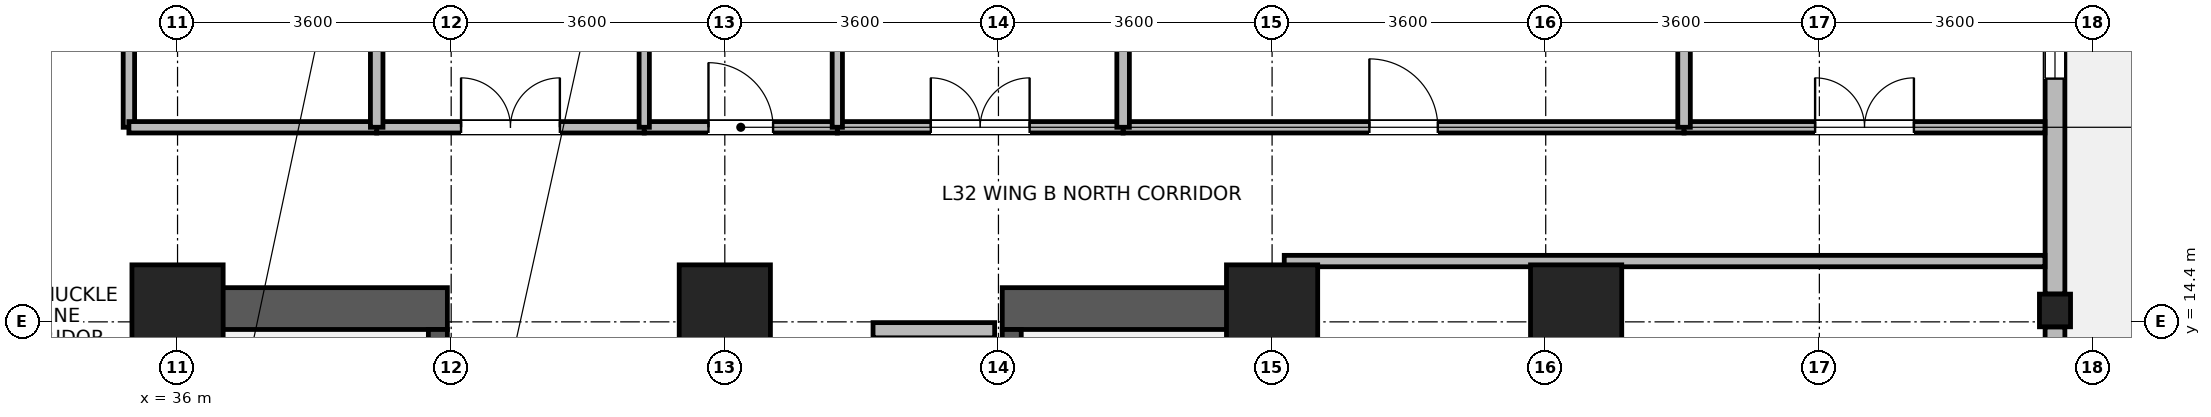
"""IFC4 building model, lengths in metres.
Left out: names, types, materials, properties, quantities, classifications, styles, units other than length and angle.
Written with IfcOpenShell. Run it as: python <this file> out.ifc"""

import sys

from ifc_helpers import new_model, si_unit, direction, frame, frame_2d, origin, origin_2d, place, context, subcontext, project, spatial, rectangle, i_section, extrude, source, transform, mapped, element, fill, save


model = new_model("IFC4")
c1 = context("Model", 3, precision=1e-05, world=origin(), true_north=direction((0.0, 1.0)))
c2 = subcontext(c1, "Body", "Model", "MODEL_VIEW")
j1 = project(units=[si_unit("LENGTHUNIT", "METRE"), si_unit("PLANEANGLEUNIT", "RADIAN")], contexts=[c1])
p1 = place(None, origin())
s1 = spatial("IfcSite", under=j1, at=p1, CompositionType="ELEMENT")
p2 = place(p1, origin())
s2 = spatial("IfcBuilding", under=s1, at=p2, CompositionType="ELEMENT")
p3 = place(p2, frame((0.0, 0.0, 126.7)))
s3 = spatial("IfcBuildingStorey", under=s2, at=p3, CompositionType="ELEMENT", Elevation=126.7)
for number, where, z_axis, x_axis in (
    (1, (36.075, 6.75, 0.0), (0.0, 0.0, 1.0), (0.0, 1.0, 0.0)),
    (2, (50.325, 6.75, 0.0), (0.0, 0.0, 1.0), (0.0, 1.0, 0.0)),
):
    element("IfcWall", number, at=place(p3, frame(where, z_axis=z_axis, x_axis=x_axis)), inside=s3, PredefinedType="SHEAR", context=c2, shape_type="SweptSolid", body=[
        extrude(rectangle(XDim=8.1, YDim=0.55, at=frame_2d((4.05, 0.0))), origin(), (0.0, 0.0, 1.0), 3.34),
    ])
for number, where, z_axis, x_axis in (
    (3, (36.35, 14.575, 0.0), (0.0, 0.0, 1.0), (1.0, 0.0, 0.0)),
    (4, (46.85, 14.575, 0.0), (0.0, 0.0, 1.0), (1.0, 0.0, 0.0)),
):
    element("IfcWall", number, at=place(p3, frame(where, z_axis=z_axis, x_axis=x_axis)), inside=s3, PredefinedType="SHEAR", context=c2, shape_type="SweptSolid", body=[
        extrude(rectangle(XDim=3.2, YDim=0.55, at=frame_2d((1.6, 0.0))), origin(), (0.0, 0.0, 1.0), 3.34),
    ])
p4 = place(p3, frame((39.425, 7.3, 0.0), z_axis=(0.0, 0.0, 1.0), x_axis=(0.0, 1.0, 0.0)))
e5 = element("IfcWall", 5, at=p4, inside=s3, PredefinedType="SHEAR", context=c2, shape_type="SweptSolid", body=[
    extrude(rectangle(XDim=7.0, YDim=0.25, at=frame_2d((3.5, 0.0))), origin(), (0.0, 0.0, 1.0), 3.34),
])
p5 = place(p4, frame((0.15, 0.0, 0.0)))
e6 = element("IfcOpeningElement", 6, at=p5, cuts=e5, PredefinedType="OPENING", context=c2, shape_type="SweptSolid", body=[
    extrude(rectangle(XDim=1.1, YDim=2.08, at=frame_2d((0.55, 1.04))), frame((0.0, 0.135, 0.0), z_axis=(0.0, -1.0, 0.0), x_axis=(1.0, 0.0, 0.0)), (0.0, 0.0, 1.0), 0.27),
])
p6 = place(p3, frame((46.975, 7.3, 0.0), z_axis=(0.0, 0.0, 1.0), x_axis=(0.0, 1.0, 0.0)))
e7 = element("IfcWall", 7, at=p6, inside=s3, PredefinedType="SHEAR", context=c2, shape_type="SweptSolid", body=[
    extrude(rectangle(XDim=7.0, YDim=0.25, at=frame_2d((3.5, 0.0))), origin(), (0.0, 0.0, 1.0), 3.34),
])
p7 = place(p6, frame((0.15, 0.0, 0.0)))
e8 = element("IfcOpeningElement", 8, at=p7, cuts=e7, PredefinedType="OPENING", context=c2, shape_type="SweptSolid", body=[
    extrude(rectangle(XDim=1.1, YDim=2.08, at=frame_2d((0.55, 1.04))), frame((0.0, 0.135, 0.0), z_axis=(0.0, -1.0, 0.0), x_axis=(1.0, 0.0, 0.0)), (0.0, 0.0, 1.0), 0.27),
])
m1 = source(origin(), c2, "Body", "SweptSolid", [
    extrude(rectangle(XDim=1.2, YDim=1.2, at=origin_2d()), origin(), (0.0, 0.0, 1.0), 3.7),
])
for number, where, z_axis, x_axis in (
    (9, (36.0, 14.55, 0.0), (0.0, 0.0, 1.0), (1.0, 0.0, 0.0)),
    (10, (43.2, 14.55, 0.0), (0.0, 0.0, 1.0), (1.0, 0.0, 0.0)),
    (11, (50.4, 14.55, 0.0), (0.0, 0.0, 1.0), (1.0, 0.0, 0.0)),
    (12, (54.4, 14.55, 0.0), (0.0, 0.0, 1.0), (1.0, 0.0, 0.0)),
):
    element("IfcColumn", number, at=place(p3, frame(where, z_axis=z_axis, x_axis=x_axis)), inside=s3, PredefinedType="COLUMN", context=c2, shape_type="MappedRepresentation", body=[
        mapped(m1, transform((0.0, 0.0, 0.0), x_axis=(1.0, 0.0, 0.0), y_axis=(0.0, 1.0, 0.0), z_axis=(0.0, 0.0, 1.0), scale=1.0)),
    ])
m2 = source(origin(), c2, "Body", "SweptSolid", [
    extrude(i_section(OverallWidth=0.409, OverallDepth=0.43, WebThickness=0.024, FlangeThickness=0.033, FilletRadius=0.015, at=origin_2d()), origin(), (0.0, 0.0, 1.0), 3.7),
])
p8 = place(p3, frame((60.7, 14.55, 0.0), z_axis=(0.0, 0.0, 1.0), x_axis=(1.0, 0.0, 0.0)))
e13 = element("IfcColumn", 13, at=p8, inside=s3, PredefinedType="COLUMN", context=c2, shape_type="MappedRepresentation", body=[
    mapped(m2, transform((0.0, 0.0, 0.0), x_axis=(1.0, 0.0, 0.0), y_axis=(0.0, 1.0, 0.0), z_axis=(0.0, 0.0, 1.0), scale=1.0)),
])
p9 = place(p3, frame((60.7, 14.334, 0.0), z_axis=(0.0, 0.0, 1.0), x_axis=(0.0, -1.0, 0.0)))
e14 = element("IfcWall", 14, at=p9, inside=s3, PredefinedType="STANDARD", context=c2, shape_type="SweptSolid", body=[
    extrude(rectangle(XDim=7.068, YDim=0.26, at=frame_2d((3.534, 0.0))), origin(), (0.0, 0.0, 1.0), 2.87),
])
p10 = place(p9, frame((2.784, 0.0, 0.0)))
e15 = element("IfcOpeningElement", 15, at=p10, cuts=e14, PredefinedType="OPENING", context=c2, shape_type="SweptSolid", body=[
    extrude(rectangle(XDim=1.5, YDim=2.15, at=frame_2d((0.75, 1.075))), frame((0.0, 0.14, 0.0), z_axis=(0.0, -1.0, 0.0), x_axis=(1.0, 0.0, 0.0)), (0.0, 0.0, 1.0), 0.28),
])
p11 = place(p9, frame((1.017, 0.0, 0.85)))
e16 = element("IfcOpeningElement", 16, at=p11, cuts=e14, PredefinedType="OPENING", context=c2, shape_type="SweptSolid", body=[
    extrude(rectangle(XDim=1.5, YDim=1.85, at=frame_2d((0.75, 0.925))), frame((0.0, 0.14, 0.0), z_axis=(0.0, -1.0, 0.0), x_axis=(1.0, 0.0, 0.0)), (0.0, 0.0, 1.0), 0.28),
])
p12 = place(p9, frame((4.551, 0.0, 0.85)))
e17 = element("IfcOpeningElement", 17, at=p12, cuts=e14, PredefinedType="OPENING", context=c2, shape_type="SweptSolid", body=[
    extrude(rectangle(XDim=1.5, YDim=1.85, at=frame_2d((0.75, 0.925))), frame((0.0, 0.14, 0.0), z_axis=(0.0, -1.0, 0.0), x_axis=(1.0, 0.0, 0.0)), (0.0, 0.0, 1.0), 0.28),
])
p13 = place(p3, frame((60.7, 21.384, 0.0), z_axis=(0.0, 0.0, 1.0), x_axis=(0.0, -1.0, 0.0)))
e18 = element("IfcWall", 18, at=p13, inside=s3, PredefinedType="STANDARD", context=c2, shape_type="SweptSolid", body=[
    extrude(rectangle(XDim=6.618, YDim=0.26, at=frame_2d((3.309, 0.0))), origin(), (0.0, 0.0, 1.0), 2.87),
])
p14 = place(p13, frame((0.905, 0.0, 0.85)))
e19 = element("IfcOpeningElement", 19, at=p14, cuts=e18, PredefinedType="OPENING", context=c2, shape_type="SweptSolid", body=[
    extrude(rectangle(XDim=1.5, YDim=1.85, at=frame_2d((0.75, 0.925))), frame((0.0, 0.14, 0.0), z_axis=(0.0, -1.0, 0.0), x_axis=(1.0, 0.0, 0.0)), (0.0, 0.0, 1.0), 0.28),
])
p15 = place(p13, frame((2.834, 0.0, 0.85)))
e20 = element("IfcOpeningElement", 20, at=p15, cuts=e18, PredefinedType="OPENING", context=c2, shape_type="SweptSolid", body=[
    extrude(rectangle(XDim=0.95, YDim=1.75, at=frame_2d((0.475, 0.875))), frame((0.0, 0.14, 0.0), z_axis=(0.0, -1.0, 0.0), x_axis=(1.0, 0.0, 0.0)), (0.0, 0.0, 1.0), 0.28),
])
p16 = place(p3, frame((45.15, 14.29, 0.0), z_axis=(0.0, 0.0, 1.0), x_axis=(1.0, 0.0, 0.0)))
e21 = element("IfcWall", 21, at=p16, inside=s3, PredefinedType="PARTITIONING", context=c2, shape_type="SweptSolid", body=[
    extrude(rectangle(XDim=1.6, YDim=0.2, at=frame_2d((0.8, 0.0))), origin(), (0.0, 0.0, 1.0), 2.32),
])
p17 = place(p3, frame((50.56, 15.2, 0.0), z_axis=(0.0, 0.0, 1.0), x_axis=(1.0, 0.0, 0.0)))
e22 = element("IfcWall", 22, at=p17, inside=s3, PredefinedType="PARTITIONING", context=c2, shape_type="SweptSolid", body=[
    extrude(rectangle(XDim=10.008, YDim=0.15, at=frame_2d((5.004, 0.0))), origin(), (0.0, 0.0, 1.0), 3.32),
])
p18 = place(p3, frame((35.36, 16.96, 0.0), z_axis=(0.0, 0.0, 1.0), x_axis=(0.0, 1.0, 0.0)))
e23 = element("IfcWall", 23, at=p18, inside=s3, PredefinedType="PARTITIONING", context=c2, shape_type="SweptSolid", body=[
    extrude(rectangle(XDim=9.64, YDim=0.15, at=frame_2d((4.82, 0.0))), origin(), (0.0, 0.0, 1.0), 3.32),
])
p19 = place(p18, frame((2.435, 0.0, 0.0)))
e24 = element("IfcOpeningElement", 24, at=p19, cuts=e23, PredefinedType="OPENING", context=c2, shape_type="SweptSolid", body=[
    extrude(rectangle(XDim=1.3, YDim=2.12, at=frame_2d((0.65, 1.06))), frame((0.0, 0.085, 0.0), z_axis=(0.0, -1.0, 0.0), x_axis=(1.0, 0.0, 0.0)), (0.0, 0.0, 1.0), 0.17),
])
p20 = place(p3, frame((48.44, 16.96, 0.0), z_axis=(0.0, 0.0, 1.0), x_axis=(1.0, 0.0, 0.0)))
e25 = element("IfcWall", 25, at=p20, inside=s3, PredefinedType="PARTITIONING", context=c2, shape_type="SweptSolid", body=[
    extrude(rectangle(XDim=7.38, YDim=0.15, at=frame_2d((3.69, 0.0))), origin(), (0.0, 0.0, 1.0), 3.32),
])
p21 = place(p20, frame((3.24, 0.0, 0.0)))
e26 = element("IfcOpeningElement", 26, at=p21, cuts=e25, PredefinedType="OPENING", context=c2, shape_type="SweptSolid", body=[
    extrude(rectangle(XDim=0.9, YDim=2.08, at=frame_2d((0.45, 1.04))), frame((0.0, 0.085, 0.0), z_axis=(0.0, -1.0, 0.0), x_axis=(1.0, 0.0, 0.0)), (0.0, 0.0, 1.0), 0.17),
])
p22 = place(p3, frame((55.82, 16.96, 0.0), z_axis=(0.0, 0.0, 1.0), x_axis=(1.0, 0.0, 0.0)))
e27 = element("IfcWall", 27, at=p22, inside=s3, PredefinedType="PARTITIONING", context=c2, shape_type="SweptSolid", body=[
    extrude(rectangle(XDim=4.748, YDim=0.15, at=frame_2d((2.374, 0.0))), origin(), (0.0, 0.0, 1.0), 3.32),
])
p23 = place(p22, frame((1.724, 0.0, 0.0)))
e28 = element("IfcOpeningElement", 28, at=p23, cuts=e27, PredefinedType="OPENING", context=c2, shape_type="SweptSolid", body=[
    extrude(rectangle(XDim=1.3, YDim=2.12, at=frame_2d((0.65, 1.06))), frame((0.0, 0.085, 0.0), z_axis=(0.0, -1.0, 0.0), x_axis=(1.0, 0.0, 0.0)), (0.0, 0.0, 1.0), 0.17),
])
p24 = place(p3, frame((44.68, 16.96, 0.0), z_axis=(0.0, 0.0, 1.0), x_axis=(1.0, 0.0, 0.0)))
e29 = element("IfcWall", 29, at=p24, inside=s3, PredefinedType="PARTITIONING", context=c2, shape_type="SweptSolid", body=[
    extrude(rectangle(XDim=3.76, YDim=0.15, at=frame_2d((1.88, 0.0))), origin(), (0.0, 0.0, 1.0), 3.32),
])
p25 = place(p24, frame((1.23, 0.0, 0.0)))
e30 = element("IfcOpeningElement", 30, at=p25, cuts=e29, PredefinedType="OPENING", context=c2, shape_type="SweptSolid", body=[
    extrude(rectangle(XDim=1.3, YDim=2.12, at=frame_2d((0.65, 1.06))), frame((0.0, 0.085, 0.0), z_axis=(0.0, -1.0, 0.0), x_axis=(1.0, 0.0, 0.0)), (0.0, 0.0, 1.0), 0.17),
])
p26 = place(p3, frame((38.62, 16.96, 0.0), z_axis=(0.0, 0.0, 1.0), x_axis=(1.0, 0.0, 0.0)))
e31 = element("IfcWall", 31, at=p26, inside=s3, PredefinedType="PARTITIONING", context=c2, shape_type="SweptSolid", body=[
    extrude(rectangle(XDim=3.52, YDim=0.15, at=frame_2d((1.76, 0.0))), origin(), (0.0, 0.0, 1.0), 3.32),
])
p27 = place(p26, frame((1.11, 0.0, 0.0)))
e32 = element("IfcOpeningElement", 32, at=p27, cuts=e31, PredefinedType="OPENING", context=c2, shape_type="SweptSolid", body=[
    extrude(rectangle(XDim=1.3, YDim=2.12, at=frame_2d((0.65, 1.06))), frame((0.0, 0.085, 0.0), z_axis=(0.0, -1.0, 0.0), x_axis=(1.0, 0.0, 0.0)), (0.0, 0.0, 1.0), 0.17),
])
p28 = place(p3, frame((35.36, 16.96, 0.0), z_axis=(0.0, 0.0, 1.0), x_axis=(1.0, 0.0, 0.0)))
e33 = element("IfcWall", 33, at=p28, inside=s3, PredefinedType="PARTITIONING", context=c2, shape_type="SweptSolid", body=[
    extrude(rectangle(XDim=3.26, YDim=0.15, at=frame_2d((1.63, 0.0))), origin(), (0.0, 0.0, 1.0), 3.32),
])
p29 = place(p3, frame((42.14, 16.96, 0.0), z_axis=(0.0, 0.0, 1.0), x_axis=(1.0, 0.0, 0.0)))
e34 = element("IfcWall", 34, at=p29, inside=s3, PredefinedType="PARTITIONING", context=c2, shape_type="SweptSolid", body=[
    extrude(rectangle(XDim=2.54, YDim=0.15, at=frame_2d((1.27, 0.0))), origin(), (0.0, 0.0, 1.0), 3.32),
])
p30 = place(p29, frame((0.845, 0.0, 0.0)))
e35 = element("IfcOpeningElement", 35, at=p30, cuts=e34, PredefinedType="OPENING", context=c2, shape_type="SweptSolid", body=[
    extrude(rectangle(XDim=0.85, YDim=2.04, at=frame_2d((0.425, 1.02))), frame((0.0, 0.085, 0.0), z_axis=(0.0, -1.0, 0.0), x_axis=(1.0, 0.0, 0.0)), (0.0, 0.0, 1.0), 0.17),
])
p31 = place(p3, frame((38.62, 16.96, 0.0), z_axis=(0.0, 0.0, 1.0), x_axis=(0.0, 1.0, 0.0)))
e36 = element("IfcWall", 36, at=p31, inside=s3, PredefinedType="PARTITIONING", context=c2, shape_type="SweptSolid", body=[
    extrude(rectangle(XDim=9.64, YDim=0.165, at=frame_2d((4.82, 0.0))), origin(), (0.0, 0.0, 1.0), 3.32),
])
for number, where, z_axis, x_axis in (
    (37, (42.14, 16.96, 0.0), (0.0, 0.0, 1.0), (0.0, 1.0, 0.0)),
    (38, (44.68, 16.96, 0.0), (0.0, 0.0, 1.0), (0.0, 1.0, 0.0)),
):
    element("IfcWall", number, at=place(p3, frame(where, z_axis=z_axis, x_axis=x_axis)), inside=s3, PredefinedType="PARTITIONING", context=c2, shape_type="SweptSolid", body=[
        extrude(rectangle(XDim=9.64, YDim=0.135, at=frame_2d((4.82, 0.0))), origin(), (0.0, 0.0, 1.0), 3.32),
    ])
for number, where, z_axis, x_axis in (
    (39, (48.44, 16.96, 0.0), (0.0, 0.0, 1.0), (0.0, 1.0, 0.0)),
    (40, (55.82, 16.96, 0.0), (0.0, 0.0, 1.0), (0.0, 1.0, 0.0)),
):
    element("IfcWall", number, at=place(p3, frame(where, z_axis=z_axis, x_axis=x_axis)), inside=s3, PredefinedType="PARTITIONING", context=c2, shape_type="SweptSolid", body=[
        extrude(rectangle(XDim=9.64, YDim=0.165, at=frame_2d((4.82, 0.0))), origin(), (0.0, 0.0, 1.0), 3.32),
    ])
p32 = place(p15, origin())
e41 = element("IfcWindow", 41, at=p32, inside=s3, PartitioningType="SINGLE_PANEL", PredefinedType="WINDOW", context=c2, shape_type="SweptSolid", body=[
    extrude(rectangle(XDim=0.95, YDim=1.75, at=frame_2d((0.475, 0.875))), frame((0.0, 0.03, 0.0), z_axis=(0.0, -1.0, 0.0), x_axis=(1.0, 0.0, 0.0)), (0.0, 0.0, 1.0), 0.06),
])
fill(e20, e41)
p33 = place(p21, origin())
e42 = element("IfcDoor", 42, at=p33, inside=s3, OperationType="SINGLE_SWING_LEFT", PredefinedType="DOOR", context=c2, shape_type="SweptSolid", body=[
    extrude(rectangle(XDim=0.9, YDim=2.08, at=frame_2d((0.45, 1.04))), frame((0.0, 0.025, 0.0), z_axis=(0.0, -1.0, 0.0), x_axis=(1.0, 0.0, 0.0)), (0.0, 0.0, 1.0), 0.05),
])
fill(e26, e42)
p34 = place(p23, origin())
e43 = element("IfcDoor", 43, at=p34, inside=s3, OperationType="DOUBLE_DOOR_SINGLE_SWING", PredefinedType="DOOR", context=c2, shape_type="SweptSolid", body=[
    extrude(rectangle(XDim=1.3, YDim=2.12, at=frame_2d((0.65, 1.06))), frame((0.0, 0.025, 0.0), z_axis=(0.0, -1.0, 0.0), x_axis=(1.0, 0.0, 0.0)), (0.0, 0.0, 1.0), 0.05),
])
fill(e28, e43)
p35 = place(p25, origin())
e44 = element("IfcDoor", 44, at=p35, inside=s3, OperationType="DOUBLE_DOOR_SINGLE_SWING", PredefinedType="DOOR", context=c2, shape_type="SweptSolid", body=[
    extrude(rectangle(XDim=1.3, YDim=2.12, at=frame_2d((0.65, 1.06))), frame((0.0, 0.025, 0.0), z_axis=(0.0, -1.0, 0.0), x_axis=(1.0, 0.0, 0.0)), (0.0, 0.0, 1.0), 0.05),
])
fill(e30, e44)
p36 = place(p27, origin())
e45 = element("IfcDoor", 45, at=p36, inside=s3, OperationType="DOUBLE_DOOR_SINGLE_SWING", PredefinedType="DOOR", context=c2, shape_type="SweptSolid", body=[
    extrude(rectangle(XDim=1.3, YDim=2.12, at=frame_2d((0.65, 1.06))), frame((0.0, 0.025, 0.0), z_axis=(0.0, -1.0, 0.0), x_axis=(1.0, 0.0, 0.0)), (0.0, 0.0, 1.0), 0.05),
])
fill(e32, e45)
p37 = place(p30, origin())
e46 = element("IfcDoor", 46, at=p37, inside=s3, OperationType="SINGLE_SWING_LEFT", PredefinedType="DOOR", context=c2, shape_type="SweptSolid", body=[
    extrude(rectangle(XDim=0.85, YDim=2.04, at=frame_2d((0.425, 1.02))), frame((0.0, 0.025, 0.0), z_axis=(0.0, -1.0, 0.0), x_axis=(1.0, 0.0, 0.0)), (0.0, 0.0, 1.0), 0.05),
])
fill(e35, e46)
save(model, sys.argv[1])
